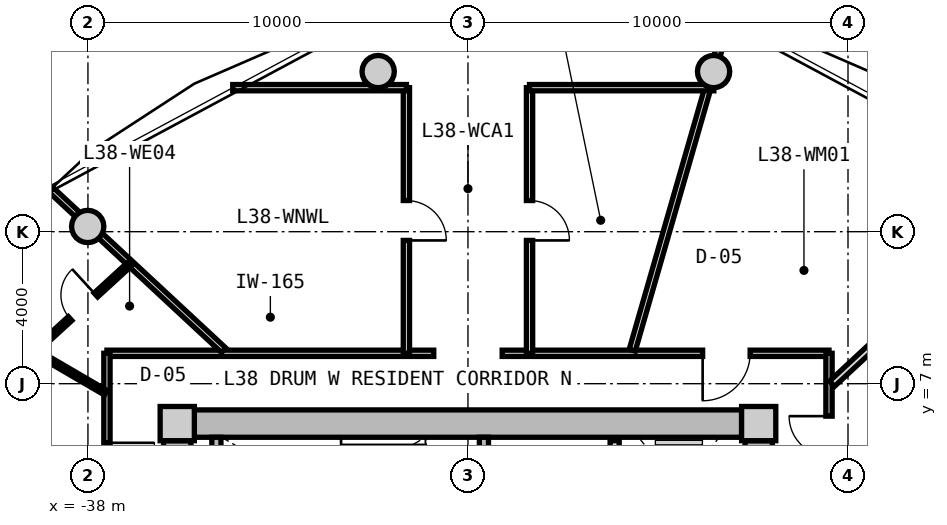
"""IFC4 building model, lengths in metres.
Left out: names, types, materials, properties, quantities, classifications, styles, units other than length and angle.
Written with IfcOpenShell. Run it as: python <this file> out.ifc"""

import sys

from ifc_helpers import new_model, si_unit, direction, frame, frame_2d, origin, origin_2d, place, context, subcontext, project, spatial, rectangle, circle, extrude, source, transform, mapped, element, fill, save


model = new_model("IFC4")
c1 = context("Model", 3, precision=1e-05, world=origin(), true_north=direction((0.0, 1.0)))
c2 = subcontext(c1, "Body", "Model", "MODEL_VIEW")
j1 = project(units=[si_unit("LENGTHUNIT", "METRE"), si_unit("PLANEANGLEUNIT", "RADIAN")], contexts=[c1])
p1 = place(None, origin())
s1 = spatial("IfcSite", under=j1, at=p1, CompositionType="ELEMENT")
p2 = place(p1, origin())
s2 = spatial("IfcBuilding", under=s1, at=p2, CompositionType="ELEMENT")
p3 = place(p2, frame((0.0, 0.0, 123.7)))
s3 = spatial("IfcBuildingStorey", under=s2, at=p3, CompositionType="ELEMENT", Elevation=123.7)
m1 = source(origin(), c2, "Body", "SweptSolid", [
    extrude(rectangle(XDim=0.9, YDim=0.9, at=origin_2d()), origin(), (0.0, 0.0, 1.0), 3.05),
])
for number, where, z_axis, x_axis in (
    (1, (-20.35, 5.95, 0.0), (0.0, 0.0, 1.0), (1.0, 0.0, 0.0)),
    (2, (-35.65, 5.95, 0.0), (0.0, 0.0, 1.0), (1.0, 0.0, 0.0)),
):
    element("IfcColumn", number, at=place(p3, frame(where, z_axis=z_axis, x_axis=x_axis)), inside=s3, PredefinedType="COLUMN", context=c2, shape_type="MappedRepresentation", body=[
        mapped(m1, transform((0.0, 0.0, 0.0), x_axis=(1.0, 0.0, 0.0), y_axis=(0.0, 1.0, 0.0), z_axis=(0.0, 0.0, 1.0), scale=1.0)),
    ])
m2 = source(origin(), c2, "Body", "SweptSolid", [
    extrude(rectangle(XDim=14.4, YDim=0.72, at=frame_2d((7.2, 0.0))), origin(), (0.0, 0.0, 1.0), 2.79),
])
p4 = place(p3, frame((-35.2, 5.95, 0.0), z_axis=(0.0, 0.0, 1.0), x_axis=(1.0, 0.0, 0.0)))
e3 = element("IfcWall", 3, at=p4, inside=s3, PredefinedType="SHEAR", context=c2, shape_type="MappedRepresentation", body=[
    mapped(m2, transform((0.0, 0.0, 0.0), x_axis=(1.0, 0.0, 0.0), y_axis=(0.0, 1.0, 0.0), z_axis=(0.0, 0.0, 1.0), scale=1.0)),
])
m3 = source(origin(), c2, "Body", "SweptSolid", [
    extrude(rectangle(XDim=11.0, YDim=0.72, at=frame_2d((5.5, 0.0))), origin(), (0.0, 0.0, 1.0), 2.79),
])
p5 = place(p3, frame((-35.65, -5.5, 0.0), z_axis=(0.0, 0.0, 1.0), x_axis=(0.0, 1.0, 0.0)))
e4 = element("IfcWall", 4, at=p5, inside=s3, PredefinedType="SHEAR", context=c2, shape_type="MappedRepresentation", body=[
    mapped(m3, transform((0.0, 0.0, 0.0), x_axis=(1.0, 0.0, 0.0), y_axis=(0.0, 1.0, 0.0), z_axis=(0.0, 0.0, 1.0), scale=1.0)),
])
p6 = place(p5, frame((3.8, 0.0, 0.0)))
e5 = element("IfcOpeningElement", 5, at=p6, cuts=e4, PredefinedType="OPENING", context=c2, shape_type="SweptSolid", body=[
    extrude(rectangle(XDim=1.2, YDim=2.15, at=frame_2d((0.6, 1.075))), frame((0.0, 0.37, 0.0), z_axis=(0.0, -1.0, 0.0), x_axis=(1.0, 0.0, 0.0)), (0.0, 0.0, 1.0), 0.74),
])
p7 = place(p3, frame((-20.35, 5.5, 0.0), z_axis=(0.0, 0.0, 1.0), x_axis=(0.0, -1.0, 0.0)))
e6 = element("IfcWall", 6, at=p7, inside=s3, PredefinedType="SHEAR", context=c2, shape_type="MappedRepresentation", body=[
    mapped(m3, transform((0.0, 0.0, 0.0), x_axis=(1.0, 0.0, 0.0), y_axis=(0.0, 1.0, 0.0), z_axis=(0.0, 0.0, 1.0), scale=1.0)),
])
p8 = place(p7, frame((5.65, 0.0, 0.0)))
e7 = element("IfcOpeningElement", 7, at=p8, cuts=e6, PredefinedType="OPENING", context=c2, shape_type="SweptSolid", body=[
    extrude(rectangle(XDim=1.2, YDim=2.15, at=frame_2d((0.6, 1.075))), frame((0.0, 0.37, 0.0), z_axis=(0.0, -1.0, 0.0), x_axis=(1.0, 0.0, 0.0)), (0.0, 0.0, 1.0), 0.74),
])
m4 = source(origin(), c2, "Body", "SweptSolid", [
    extrude(circle(Radius=0.425, at=origin_2d()), origin(), (0.0, 0.0, 1.0), 3.05),
])
for number, where, z_axis, x_axis in (
    (8, (-21.537, 15.213, 0.0), (0.0, 0.0, 1.0), (1.0, 0.0, 0.0)),
    (9, (-30.363, 15.213, 0.0), (0.0, 0.0, 1.0), (1.0, 0.0, 0.0)),
    (10, (-38.006, 11.137, 0.0), (0.0, 0.0, 1.0), (1.0, 0.0, 0.0)),
):
    element("IfcColumn", number, at=place(p3, frame(where, z_axis=z_axis, x_axis=x_axis)), inside=s3, PredefinedType="COLUMN", context=c2, shape_type="MappedRepresentation", body=[
        mapped(m4, transform((0.0, 0.0, 0.0), x_axis=(1.0, 0.0, 0.0), y_axis=(0.0, 1.0, 0.0), z_axis=(0.0, 0.0, 1.0), scale=1.0)),
    ])
m5 = source(origin(), c2, "Body", "SweptSolid", [
    extrude(rectangle(XDim=3.14, YDim=0.24, at=frame_2d((1.57, 0.0))), origin(), (0.0, 0.0, 1.0), 2.79),
])
p9 = place(p3, frame((-34.62, 2.45, 0.0), z_axis=(0.0, 0.0, 1.0), x_axis=(0.0, 1.0, 0.0)))
e11 = element("IfcWall", 11, at=p9, inside=s3, PredefinedType="PARTITIONING", context=c2, shape_type="MappedRepresentation", body=[
    mapped(m5, transform((0.0, 0.0, 0.0), x_axis=(1.0, 0.0, 0.0), y_axis=(0.0, 1.0, 0.0), z_axis=(0.0, 0.0, 1.0), scale=1.0)),
])
p10 = place(p3, frame((-27.58, 2.45, 0.0), z_axis=(0.0, 0.0, 1.0), x_axis=(0.0, 1.0, 0.0)))
e12 = element("IfcWall", 12, at=p10, inside=s3, PredefinedType="PARTITIONING", context=c2, shape_type="MappedRepresentation", body=[
    mapped(m5, transform((0.0, 0.0, 0.0), x_axis=(1.0, 0.0, 0.0), y_axis=(0.0, 1.0, 0.0), z_axis=(0.0, 0.0, 1.0), scale=1.0)),
])
p11 = place(p10, frame((0.55, 0.0, 0.0)))
e13 = element("IfcOpeningElement", 13, at=p11, cuts=e12, PredefinedType="OPENING", context=c2, shape_type="SweptSolid", body=[
    extrude(rectangle(XDim=1.1, YDim=2.15, at=frame_2d((0.55, 1.075))), frame((0.0, 0.13, 0.0), z_axis=(0.0, -1.0, 0.0), x_axis=(1.0, 0.0, 0.0)), (0.0, 0.0, 1.0), 0.26),
])
m6 = source(origin(), c2, "Body", "SweptSolid", [
    extrude(rectangle(XDim=5.0, YDim=0.24, at=frame_2d((2.5, 0.0))), origin(), (0.0, 0.0, 1.0), 2.775),
])
p12 = place(p3, frame((-24.14, 0.5, 0.0), z_axis=(0.0, 0.0, 1.0), x_axis=(0.0, 1.0, 0.0)))
e14 = element("IfcWall", 14, at=p12, inside=s3, PredefinedType="PARTITIONING", context=c2, shape_type="MappedRepresentation", body=[
    mapped(m6, transform((0.0, 0.0, 0.0), x_axis=(1.0, 0.0, 0.0), y_axis=(0.0, 1.0, 0.0), z_axis=(0.0, 0.0, 1.0), scale=1.0)),
])
p13 = place(p12, frame((3.05, 0.0, 0.0)))
e15 = element("IfcOpeningElement", 15, at=p13, cuts=e14, PredefinedType="OPENING", context=c2, shape_type="SweptSolid", body=[
    extrude(rectangle(XDim=1.3, YDim=2.2, at=frame_2d((0.65, 1.1))), frame((0.0, 0.13, 0.0), z_axis=(0.0, -1.0, 0.0), x_axis=(1.0, 0.0, 0.0)), (0.0, 0.0, 1.0), 0.26),
])
p14 = place(p12, frame((0.55, 0.0, 0.0)))
e16 = element("IfcOpeningElement", 16, at=p14, cuts=e14, PredefinedType="OPENING", context=c2, shape_type="SweptSolid", body=[
    extrude(rectangle(XDim=1.3, YDim=2.2, at=frame_2d((0.65, 1.1))), frame((0.0, 0.13, 0.0), z_axis=(0.0, -1.0, 0.0), x_axis=(1.0, 0.0, 0.0)), (0.0, 0.0, 1.0), 0.26),
])
m7 = source(origin(), c2, "Body", "SweptSolid", [
    extrude(rectangle(XDim=8.6, YDim=0.165, at=frame_2d((4.3, 0.0))), origin(), (0.0, 0.0, 1.0), 2.775),
])
p15 = place(p3, frame((-37.5, 7.8, 0.0), z_axis=(0.0, 0.0, 1.0), x_axis=(1.0, 0.0, 0.0)))
e17 = element("IfcWall", 17, at=p15, inside=s3, PredefinedType="PARTITIONING", context=c2, shape_type="MappedRepresentation", body=[
    mapped(m7, transform((0.0, 0.0, 0.0), x_axis=(1.0, 0.0, 0.0), y_axis=(0.0, 1.0, 0.0), z_axis=(0.0, 0.0, 1.0), scale=1.0)),
])
p16 = place(p3, frame((-27.1, 7.8, 0.0), z_axis=(0.0, 0.0, 1.0), x_axis=(1.0, 0.0, 0.0)))
e18 = element("IfcWall", 18, at=p16, inside=s3, PredefinedType="PARTITIONING", context=c2, shape_type="MappedRepresentation", body=[
    mapped(m7, transform((0.0, 0.0, 0.0), x_axis=(1.0, 0.0, 0.0), y_axis=(0.0, 1.0, 0.0), z_axis=(0.0, 0.0, 1.0), scale=1.0)),
])
p17 = place(p16, frame((5.275, 0.0, 0.0)))
e19 = element("IfcOpeningElement", 19, at=p17, cuts=e18, PredefinedType="OPENING", context=c2, shape_type="SweptSolid", body=[
    extrude(rectangle(XDim=1.25, YDim=2.2, at=frame_2d((0.625, 1.1))), frame((0.0, 0.093, 0.0), z_axis=(0.0, -1.0, 0.0), x_axis=(1.0, 0.0, 0.0)), (0.0, 0.0, 1.0), 0.185),
])
m8 = source(origin(), c2, "Body", "SweptSolid", [
    extrude(rectangle(XDim=15.6, YDim=0.165, at=frame_2d((7.8, 0.0))), origin(), (0.0, 0.0, 1.0), 2.775),
])
p18 = place(p3, frame((-37.5, -7.8, 0.0), z_axis=(0.0, 0.0, 1.0), x_axis=(0.0, 1.0, 0.0)))
e20 = element("IfcWall", 20, at=p18, inside=s3, PredefinedType="PARTITIONING", context=c2, shape_type="MappedRepresentation", body=[
    mapped(m8, transform((0.0, 0.0, 0.0), x_axis=(1.0, 0.0, 0.0), y_axis=(0.0, 1.0, 0.0), z_axis=(0.0, 0.0, 1.0), scale=1.0)),
])
p19 = place(p18, frame((11.994, 0.0, 0.0)))
e21 = element("IfcOpeningElement", 21, at=p19, cuts=e20, PredefinedType="OPENING", context=c2, shape_type="SweptSolid", body=[
    extrude(rectangle(XDim=1.25, YDim=2.2, at=frame_2d((0.625, 1.1))), frame((0.0, 0.093, 0.0), z_axis=(0.0, -1.0, 0.0), x_axis=(1.0, 0.0, 0.0)), (0.0, 0.0, 1.0), 0.185),
])
p20 = place(p18, frame((7.984, 0.0, 0.0)))
e22 = element("IfcOpeningElement", 22, at=p20, cuts=e20, PredefinedType="OPENING", context=c2, shape_type="SweptSolid", body=[
    extrude(rectangle(XDim=1.05, YDim=2.15, at=frame_2d((0.525, 1.075))), frame((0.0, 0.093, 0.0), z_axis=(0.0, -1.0, 0.0), x_axis=(1.0, 0.0, 0.0)), (0.0, 0.0, 1.0), 0.185),
])
p21 = place(p18, frame((5.777, 0.0, 0.0)))
e23 = element("IfcOpeningElement", 23, at=p21, cuts=e20, PredefinedType="OPENING", context=c2, shape_type="SweptSolid", body=[
    extrude(rectangle(XDim=1.05, YDim=2.15, at=frame_2d((0.525, 1.075))), frame((0.0, 0.093, 0.0), z_axis=(0.0, -1.0, 0.0), x_axis=(1.0, 0.0, 0.0)), (0.0, 0.0, 1.0), 0.185),
])
p22 = place(p18, frame((2.676, 0.0, 0.0)))
e24 = element("IfcOpeningElement", 24, at=p22, cuts=e20, PredefinedType="OPENING", context=c2, shape_type="SweptSolid", body=[
    extrude(rectangle(XDim=1.05, YDim=2.15, at=frame_2d((0.525, 1.075))), frame((0.0, 0.093, 0.0), z_axis=(0.0, -1.0, 0.0), x_axis=(1.0, 0.0, 0.0)), (0.0, 0.0, 1.0), 0.185),
])
p23 = place(p3, frame((-18.5, 7.8, 0.0), z_axis=(0.0, 0.0, 1.0), x_axis=(0.0, -1.0, 0.0)))
e25 = element("IfcWall", 25, at=p23, inside=s3, PredefinedType="PARTITIONING", context=c2, shape_type="MappedRepresentation", body=[
    mapped(m8, transform((0.0, 0.0, 0.0), x_axis=(1.0, 0.0, 0.0), y_axis=(0.0, 1.0, 0.0), z_axis=(0.0, 0.0, 1.0), scale=1.0)),
])
p24 = place(p23, frame((12.002, 0.0, 0.0)))
e26 = element("IfcOpeningElement", 26, at=p24, cuts=e25, PredefinedType="OPENING", context=c2, shape_type="SweptSolid", body=[
    extrude(rectangle(XDim=1.05, YDim=2.15, at=frame_2d((0.525, 1.075))), frame((0.0, 0.093, 0.0), z_axis=(0.0, -1.0, 0.0), x_axis=(1.0, 0.0, 0.0)), (0.0, 0.0, 1.0), 0.185),
])
p25 = place(p23, frame((10.211, 0.0, 0.0)))
e27 = element("IfcOpeningElement", 27, at=p25, cuts=e25, PredefinedType="OPENING", context=c2, shape_type="SweptSolid", body=[
    extrude(rectangle(XDim=1.05, YDim=2.15, at=frame_2d((0.525, 1.075))), frame((0.0, 0.093, 0.0), z_axis=(0.0, -1.0, 0.0), x_axis=(1.0, 0.0, 0.0)), (0.0, 0.0, 1.0), 0.185),
])
p26 = place(p23, frame((7.722, 0.0, 0.0)))
e28 = element("IfcOpeningElement", 28, at=p26, cuts=e25, PredefinedType="OPENING", context=c2, shape_type="SweptSolid", body=[
    extrude(rectangle(XDim=1.05, YDim=2.15, at=frame_2d((0.525, 1.075))), frame((0.0, 0.093, 0.0), z_axis=(0.0, -1.0, 0.0), x_axis=(1.0, 0.0, 0.0)), (0.0, 0.0, 1.0), 0.185),
])
p27 = place(p23, frame((6.291, 0.0, 0.0)))
e29 = element("IfcOpeningElement", 29, at=p27, cuts=e25, PredefinedType="OPENING", context=c2, shape_type="SweptSolid", body=[
    extrude(rectangle(XDim=1.05, YDim=2.15, at=frame_2d((0.525, 1.075))), frame((0.0, 0.093, 0.0), z_axis=(0.0, -1.0, 0.0), x_axis=(1.0, 0.0, 0.0)), (0.0, 0.0, 1.0), 0.185),
])
p28 = place(p23, frame((4.296, 0.0, 0.0)))
e30 = element("IfcOpeningElement", 30, at=p28, cuts=e25, PredefinedType="OPENING", context=c2, shape_type="SweptSolid", body=[
    extrude(rectangle(XDim=1.05, YDim=2.15, at=frame_2d((0.525, 1.075))), frame((0.0, 0.093, 0.0), z_axis=(0.0, -1.0, 0.0), x_axis=(1.0, 0.0, 0.0)), (0.0, 0.0, 1.0), 0.185),
])
p29 = place(p23, frame((1.654, 0.0, 0.0)))
e31 = element("IfcOpeningElement", 31, at=p29, cuts=e25, PredefinedType="OPENING", context=c2, shape_type="SweptSolid", body=[
    extrude(rectangle(XDim=1.05, YDim=2.15, at=frame_2d((0.525, 1.075))), frame((0.0, 0.093, 0.0), z_axis=(0.0, -1.0, 0.0), x_axis=(1.0, 0.0, 0.0)), (0.0, 0.0, 1.0), 0.185),
])
m9 = source(origin(), c2, "Body", "SweptSolid", [
    extrude(rectangle(XDim=8.989, YDim=0.165, at=frame_2d((4.495, 0.0))), origin(), (0.0, 0.0, 1.0), 2.275),
])
p30 = place(p3, frame((-23.678, 7.88, 0.0), z_axis=(0.0, 0.0, 1.0), x_axis=(0.27702323008, 0.960863221274, 0.0)))
e32 = element("IfcWall", 32, at=p30, inside=s3, PredefinedType="PARTITIONING", context=c2, shape_type="MappedRepresentation", body=[
    mapped(m9, transform((0.0, 0.0, 0.0), x_axis=(1.0, 0.0, 0.0), y_axis=(0.0, 1.0, 0.0), z_axis=(0.0, 0.0, 1.0), scale=1.0)),
])
m10 = source(origin(), c2, "Body", "SweptSolid", [
    extrude(rectangle(XDim=6.187, YDim=0.165, at=frame_2d((3.093, 0.0))), origin(), (0.0, 0.0, 1.0), 2.275),
])
p31 = place(p3, frame((-34.429, 7.88, 0.0), z_axis=(0.0, 0.0, 1.0), x_axis=(-0.732501077882, 0.680765870841, 0.0)))
e33 = element("IfcWall", 33, at=p31, inside=s3, PredefinedType="PARTITIONING", context=c2, shape_type="MappedRepresentation", body=[
    mapped(m10, transform((0.0, 0.0, 0.0), x_axis=(1.0, 0.0, 0.0), y_axis=(0.0, 1.0, 0.0), z_axis=(0.0, 0.0, 1.0), scale=1.0)),
])
m11 = source(origin(), c2, "Body", "SweptSolid", [
    extrude(rectangle(XDim=6.99, YDim=0.165, at=frame_2d((3.495, 0.0))), origin(), (0.0, 0.0, 1.0), 2.275),
])
p32 = place(p3, frame((-29.62, 7.8, 0.0), z_axis=(0.0, 0.0, 1.0), x_axis=(0.0, 1.0, 0.0)))
e34 = element("IfcWall", 34, at=p32, inside=s3, PredefinedType="PARTITIONING", context=c2, shape_type="MappedRepresentation", body=[
    mapped(m11, transform((0.0, 0.0, 0.0), x_axis=(1.0, 0.0, 0.0), y_axis=(0.0, 1.0, 0.0), z_axis=(0.0, 0.0, 1.0), scale=1.0)),
])
p33 = place(p32, frame((2.97, 0.0, 0.0)))
e35 = element("IfcOpeningElement", 35, at=p33, cuts=e34, PredefinedType="OPENING", context=c2, shape_type="SweptSolid", body=[
    extrude(rectangle(XDim=1.05, YDim=2.15, at=frame_2d((0.525, 1.075))), frame((0.0, 0.093, 0.0), z_axis=(0.0, -1.0, 0.0), x_axis=(1.0, 0.0, 0.0)), (0.0, 0.0, 1.0), 0.185),
])
m12 = source(origin(), c2, "Body", "SweptSolid", [
    extrude(rectangle(XDim=4.569, YDim=0.165, at=frame_2d((2.285, 0.0))), origin(), (0.0, 0.0, 1.0), 2.775),
])
p34 = place(p3, frame((-34.189, 14.79, 0.0), z_axis=(0.0, 0.0, 1.0), x_axis=(1.0, 0.0, 0.0)))
e36 = element("IfcWall", 36, at=p34, inside=s3, PredefinedType="PARTITIONING", context=c2, shape_type="MappedRepresentation", body=[
    mapped(m12, transform((0.0, 0.0, 0.0), x_axis=(1.0, 0.0, 0.0), y_axis=(0.0, 1.0, 0.0), z_axis=(0.0, 0.0, 1.0), scale=1.0)),
])
m13 = source(origin(), c2, "Body", "SweptSolid", [
    extrude(rectangle(XDim=6.99, YDim=0.165, at=frame_2d((3.495, 0.0))), origin(), (0.0, 0.0, 1.0), 2.775),
])
p35 = place(p3, frame((-26.38, 7.8, 0.0), z_axis=(0.0, 0.0, 1.0), x_axis=(0.0, 1.0, 0.0)))
e37 = element("IfcWall", 37, at=p35, inside=s3, PredefinedType="PARTITIONING", context=c2, shape_type="MappedRepresentation", body=[
    mapped(m13, transform((0.0, 0.0, 0.0), x_axis=(1.0, 0.0, 0.0), y_axis=(0.0, 1.0, 0.0), z_axis=(0.0, 0.0, 1.0), scale=1.0)),
])
p36 = place(p35, frame((2.97, 0.0, 0.0)))
e38 = element("IfcOpeningElement", 38, at=p36, cuts=e37, PredefinedType="OPENING", context=c2, shape_type="SweptSolid", body=[
    extrude(rectangle(XDim=1.05, YDim=2.15, at=frame_2d((0.525, 1.075))), frame((0.0, 0.093, 0.0), z_axis=(0.0, -1.0, 0.0), x_axis=(1.0, 0.0, 0.0)), (0.0, 0.0, 1.0), 0.185),
])
m14 = source(origin(), c2, "Body", "SweptSolid", [
    extrude(rectangle(XDim=4.851, YDim=0.165, at=frame_2d((2.425, 0.0))), origin(), (0.0, 0.0, 1.0), 2.775),
])
p37 = place(p3, frame((-26.38, 14.79, 0.0), z_axis=(0.0, 0.0, 1.0), x_axis=(1.0, 0.0, 0.0)))
e39 = element("IfcWall", 39, at=p37, inside=s3, PredefinedType="PARTITIONING", context=c2, shape_type="MappedRepresentation", body=[
    mapped(m14, transform((0.0, 0.0, 0.0), x_axis=(1.0, 0.0, 0.0), y_axis=(0.0, 1.0, 0.0), z_axis=(0.0, 0.0, 1.0), scale=1.0)),
])
m15 = source(origin(), c2, "Body", "SweptSolid", [
    extrude(rectangle(XDim=2.172, YDim=0.14, at=frame_2d((1.086, 0.0))), origin(), (0.0, 0.0, 1.0), 2.775),
])
p38 = place(p3, frame((-37.53, 6.762, 0.0), z_axis=(0.0, 0.0, 1.0), x_axis=(-0.863562702562, 0.504241468688, 0.0)))
e40 = element("IfcWall", 40, at=p38, inside=s3, PredefinedType="PARTITIONING", context=c2, shape_type="MappedRepresentation", body=[
    mapped(m15, transform((0.0, 0.0, 0.0), x_axis=(1.0, 0.0, 0.0), y_axis=(0.0, 1.0, 0.0), z_axis=(0.0, 0.0, 1.0), scale=1.0)),
])
m16 = source(origin(), c2, "Body", "SweptSolid", [
    extrude(rectangle(XDim=3.457, YDim=0.14, at=frame_2d((1.729, 0.0))), origin(), (0.0, 0.0, 1.0), 2.775),
])
p39 = place(p3, frame((-39.405, 7.857, 0.0), z_axis=(0.0, 0.0, 1.0), x_axis=(0.737567375492, 0.675273549467, 0.0)))
e41 = element("IfcWall", 41, at=p39, inside=s3, PredefinedType="PARTITIONING", context=c2, shape_type="MappedRepresentation", body=[
    mapped(m16, transform((0.0, 0.0, 0.0), x_axis=(1.0, 0.0, 0.0), y_axis=(0.0, 1.0, 0.0), z_axis=(0.0, 0.0, 1.0), scale=1.0)),
])
p40 = place(p39, frame((1.268, 0.0, 0.0)))
e42 = element("IfcOpeningElement", 42, at=p40, cuts=e41, PredefinedType="OPENING", context=c2, shape_type="SweptSolid", body=[
    extrude(rectangle(XDim=0.92, YDim=2.1, at=frame_2d((0.46, 1.05))), frame((0.0, 0.08, 0.0), z_axis=(0.0, -1.0, 0.0), x_axis=(1.0, 0.0, 0.0)), (0.0, 0.0, 1.0), 0.16),
])
m17 = source(origin(), c2, "Body", "SweptSolid", [
    extrude(rectangle(XDim=7.482, YDim=0.19, at=frame_2d((3.741, 0.0))), origin(), (0.0, 0.0, 1.0), 2.275),
])
p41 = place(p3, frame((-18.42, 6.998, 0.0), z_axis=(0.0, 0.0, 1.0), x_axis=(0.732508698043, 0.680757671489, 0.0)))
e43 = element("IfcWall", 43, at=p41, inside=s3, PredefinedType="PARTITIONING", context=c2, shape_type="MappedRepresentation", body=[
    mapped(m17, transform((0.0, 0.0, 0.0), x_axis=(1.0, 0.0, 0.0), y_axis=(0.0, 1.0, 0.0), z_axis=(0.0, 0.0, 1.0), scale=1.0)),
])
m18 = source(origin(), c2, "Body", "SweptSolid", [
    extrude(rectangle(XDim=8.968, YDim=0.19, at=frame_2d((4.484, 0.0))), origin(), (0.0, 0.0, 1.0), 2.775),
])
p42 = place(p3, frame((-18.47, 4.036, 0.0), z_axis=(0.0, 0.0, 1.0), x_axis=(0.882202936563, 0.47086938605, 0.0)))
e44 = element("IfcWall", 44, at=p42, inside=s3, PredefinedType="PARTITIONING", context=c2, shape_type="MappedRepresentation", body=[
    mapped(m18, transform((0.0, 0.0, 0.0), x_axis=(1.0, 0.0, 0.0), y_axis=(0.0, 1.0, 0.0), z_axis=(0.0, 0.0, 1.0), scale=1.0)),
])
m19 = source(origin(), c2, "Body", "SweptSolid", [
    extrude(rectangle(XDim=1.05, YDim=2.15, at=frame_2d((0.525, 1.075))), frame((0.0, 0.025, 0.0), z_axis=(0.0, -1.0, 0.0), x_axis=(1.0, 0.0, 0.0)), (0.0, 0.0, 1.0), 0.05),
])
p43 = place(p33, frame((1.05, 0.0, 0.0), z_axis=(0.0, 0.0, 1.0), x_axis=(-1.0, 0.0, 0.0)))
e45 = element("IfcDoor", 45, at=p43, inside=s3, OperationType="SINGLE_SWING_RIGHT", PredefinedType="DOOR", context=c2, shape_type="MappedRepresentation", body=[
    mapped(m19, transform((0.0, 0.0, 0.0), x_axis=(1.0, 0.0, 0.0), y_axis=(0.0, 1.0, 0.0), z_axis=(0.0, 0.0, 1.0), scale=1.0)),
])
fill(e35, e45)
p44 = place(p36, frame((1.05, 0.0, 0.0), z_axis=(0.0, 0.0, 1.0), x_axis=(-1.0, 0.0, 0.0)))
e46 = element("IfcDoor", 46, at=p44, inside=s3, OperationType="SINGLE_SWING_RIGHT", PredefinedType="DOOR", context=c2, shape_type="MappedRepresentation", body=[
    mapped(m19, transform((0.0, 0.0, 0.0), x_axis=(1.0, 0.0, 0.0), y_axis=(0.0, 1.0, 0.0), z_axis=(0.0, 0.0, 1.0), scale=1.0)),
])
fill(e38, e46)
m20 = source(origin(), c2, "Body", "SweptSolid", [
    extrude(rectangle(XDim=1.25, YDim=2.2, at=frame_2d((0.625, 1.1))), frame((0.0, 0.025, 0.0), z_axis=(0.0, -1.0, 0.0), x_axis=(1.0, 0.0, 0.0)), (0.0, 0.0, 1.0), 0.05),
])
p45 = place(p19, frame((1.25, 0.0, 0.0), z_axis=(0.0, 0.0, 1.0), x_axis=(-1.0, 0.0, 0.0)))
e47 = element("IfcDoor", 47, at=p45, inside=s3, OperationType="SINGLE_SWING_LEFT", PredefinedType="DOOR", context=c2, shape_type="MappedRepresentation", body=[
    mapped(m20, transform((0.0, 0.0, 0.0), x_axis=(1.0, 0.0, 0.0), y_axis=(0.0, 1.0, 0.0), z_axis=(0.0, 0.0, 1.0), scale=1.0)),
])
fill(e21, e47)
m21 = source(origin(), c2, "Body", "SweptSolid", [
    extrude(rectangle(XDim=0.92, YDim=2.1, at=frame_2d((0.46, 1.05))), frame((0.0, 0.025, 0.0), z_axis=(0.0, -1.0, 0.0), x_axis=(1.0, 0.0, 0.0)), (0.0, 0.0, 1.0), 0.05),
])
p46 = place(p40, origin())
e48 = element("IfcDoor", 48, at=p46, inside=s3, OperationType="SINGLE_SWING_RIGHT", PredefinedType="DOOR", context=c2, shape_type="MappedRepresentation", body=[
    mapped(m21, transform((0.0, 0.0, 0.0), x_axis=(1.0, 0.0, 0.0), y_axis=(0.0, 1.0, 0.0), z_axis=(0.0, 0.0, 1.0), scale=1.0)),
])
fill(e42, e48)
p47 = place(p29, frame((1.05, 0.0, 0.0), z_axis=(0.0, 0.0, 1.0), x_axis=(-1.0, 0.0, 0.0)))
e49 = element("IfcDoor", 49, at=p47, inside=s3, OperationType="SINGLE_SWING_RIGHT", PredefinedType="DOOR", context=c2, shape_type="MappedRepresentation", body=[
    mapped(m19, transform((0.0, 0.0, 0.0), x_axis=(1.0, 0.0, 0.0), y_axis=(0.0, 1.0, 0.0), z_axis=(0.0, 0.0, 1.0), scale=1.0)),
])
fill(e31, e49)
p48 = place(p17, frame((1.25, 0.0, 0.0), z_axis=(0.0, 0.0, 1.0), x_axis=(-1.0, 0.0, 0.0)))
e50 = element("IfcDoor", 50, at=p48, inside=s3, OperationType="SINGLE_SWING_RIGHT", PredefinedType="DOOR", context=c2, shape_type="MappedRepresentation", body=[
    mapped(m20, transform((0.0, 0.0, 0.0), x_axis=(1.0, 0.0, 0.0), y_axis=(0.0, 1.0, 0.0), z_axis=(0.0, 0.0, 1.0), scale=1.0)),
])
fill(e19, e50)
save(model, sys.argv[1])
